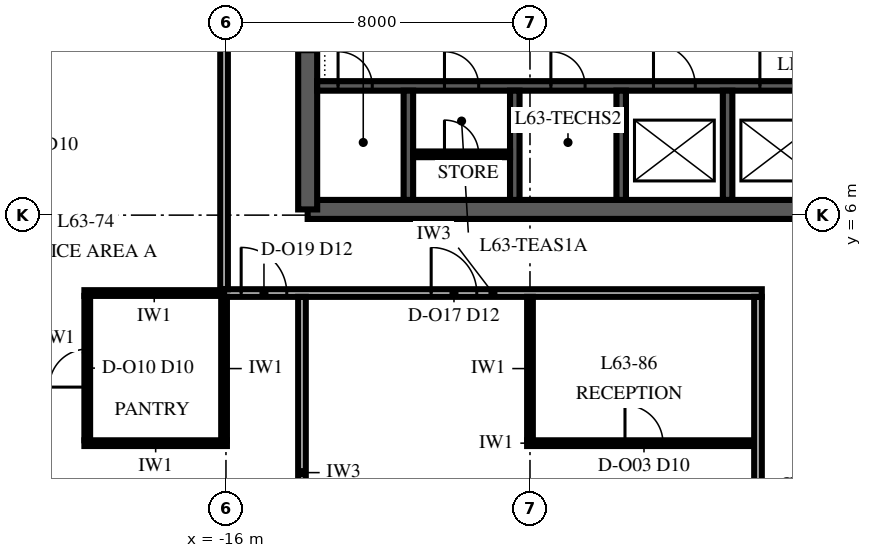
"""IFC4 building model, lengths in metres.
Left out: names, types, materials, properties, quantities, classifications, styles, units other than length and angle.
Written with IfcOpenShell. Run it as: python <this file> out.ifc"""

import sys

from ifc_helpers import new_model, si_unit, direction, frame, frame_2d, origin, place, context, subcontext, project, spatial, polyline, rectangle, outline, extrude, element, fill, save


model = new_model("IFC4")
c1 = context("Model", 3, precision=1e-05, world=origin(), true_north=direction((0.0, 1.0)))
c2 = subcontext(c1, "Body", "Model", "MODEL_VIEW")
j1 = project(units=[si_unit("LENGTHUNIT", "METRE"), si_unit("PLANEANGLEUNIT", "RADIAN")], contexts=[c1])
p1 = place(None, origin())
s1 = spatial("IfcSite", under=j1, at=p1, CompositionType="ELEMENT")
p2 = place(p1, origin())
s2 = spatial("IfcBuilding", under=s1, at=p2, CompositionType="ELEMENT")
p3 = place(p2, frame((0.0, 0.0, 272.0)))
s3 = spatial("IfcBuildingStorey", under=s2, at=p3, CompositionType="ELEMENT", Elevation=272.0)
p4 = place(p3, frame((-13.85, 6.15, 0.0), z_axis=(0.0, 0.0, 1.0), x_axis=(1.0, 0.0, 0.0)))
e1 = element("IfcWall", 1, at=p4, inside=s3, PredefinedType="SHEAR", context=c2, shape_type="SweptSolid", body=[
    extrude(rectangle(XDim=27.7, YDim=0.5, at=frame_2d((13.85, 0.0))), origin(), (0.0, 0.0, 1.0), 4.0),
])
p5 = place(p3, frame((-13.85, 23.85, 0.0), z_axis=(0.0, 0.0, 1.0), x_axis=(0.0, -1.0, 0.0)))
e2 = element("IfcWall", 2, at=p5, inside=s3, PredefinedType="SHEAR", context=c2, shape_type="SweptSolid", body=[
    extrude(outline(polyline([(0.0, -0.25), (17.7, -0.25), (17.7, 0.0), (17.45, 0.0), (17.45, 0.25), (0.25, 0.25), (0.25, 0.0), (0.0, 0.0), (0.0, -0.25)])), origin(), (0.0, 0.0, 1.0), 4.0),
])
p6 = place(p5, frame((11.75, 0.0, 0.0)))
e3 = element("IfcOpeningElement", 3, at=p6, cuts=e2, PredefinedType="OPENING", context=c2, shape_type="SweptSolid", body=[
    extrude(rectangle(XDim=1.8, YDim=2.4, at=frame_2d((0.9, 1.2))), frame((0.0, 0.265, 0.0), z_axis=(0.0, -1.0, 0.0), x_axis=(1.0, 0.0, 0.0)), (0.0, 0.0, 1.0), 0.53),
])
p7 = place(p3, frame((-13.6, 9.4, 0.0), z_axis=(0.0, 0.0, 1.0), x_axis=(1.0, 0.0, 0.0)))
e4 = element("IfcWall", 4, at=p7, inside=s3, PredefinedType="SHEAR", context=c2, shape_type="SweptSolid", body=[
    extrude(rectangle(XDim=27.2, YDim=0.25, at=frame_2d((13.6, 0.0))), origin(), (0.0, 0.0, 1.0), 4.0),
])
p8 = place(p7, frame((8.85, 0.0, 0.0)))
e5 = element("IfcOpeningElement", 5, at=p8, cuts=e4, PredefinedType="OPENING", context=c2, shape_type="SweptSolid", body=[
    extrude(rectangle(XDim=1.1, YDim=2.1, at=frame_2d((0.55, 1.05))), frame((0.0, 0.14, 0.0), z_axis=(0.0, -1.0, 0.0), x_axis=(1.0, 0.0, 0.0)), (0.0, 0.0, 1.0), 0.28),
])
p9 = place(p7, frame((11.65, 0.0, 0.0)))
e6 = element("IfcOpeningElement", 6, at=p9, cuts=e4, PredefinedType="OPENING", context=c2, shape_type="SweptSolid", body=[
    extrude(rectangle(XDim=1.1, YDim=2.1, at=frame_2d((0.55, 1.05))), frame((0.0, 0.14, 0.0), z_axis=(0.0, -1.0, 0.0), x_axis=(1.0, 0.0, 0.0)), (0.0, 0.0, 1.0), 0.28),
])
p10 = place(p7, frame((14.45, 0.0, 0.0)))
e7 = element("IfcOpeningElement", 7, at=p10, cuts=e4, PredefinedType="OPENING", context=c2, shape_type="SweptSolid", body=[
    extrude(rectangle(XDim=1.1, YDim=2.1, at=frame_2d((0.55, 1.05))), frame((0.0, 0.14, 0.0), z_axis=(0.0, -1.0, 0.0), x_axis=(1.0, 0.0, 0.0)), (0.0, 0.0, 1.0), 0.28),
])
p11 = place(p7, frame((0.55, 0.0, 0.0)))
e8 = element("IfcOpeningElement", 8, at=p11, cuts=e4, PredefinedType="OPENING", context=c2, shape_type="SweptSolid", body=[
    extrude(rectangle(XDim=0.9, YDim=2.1, at=frame_2d((0.45, 1.05))), frame((0.0, 0.14, 0.0), z_axis=(0.0, -1.0, 0.0), x_axis=(1.0, 0.0, 0.0)), (0.0, 0.0, 1.0), 0.28),
])
p12 = place(p7, frame((3.35, 0.0, 0.0)))
e9 = element("IfcOpeningElement", 9, at=p12, cuts=e4, PredefinedType="OPENING", context=c2, shape_type="SweptSolid", body=[
    extrude(rectangle(XDim=0.9, YDim=2.1, at=frame_2d((0.45, 1.05))), frame((0.0, 0.14, 0.0), z_axis=(0.0, -1.0, 0.0), x_axis=(1.0, 0.0, 0.0)), (0.0, 0.0, 1.0), 0.28),
])
p13 = place(p7, frame((6.15, 0.0, 0.0)))
e10 = element("IfcOpeningElement", 10, at=p13, cuts=e4, PredefinedType="OPENING", context=c2, shape_type="SweptSolid", body=[
    extrude(rectangle(XDim=0.9, YDim=2.1, at=frame_2d((0.45, 1.05))), frame((0.0, 0.14, 0.0), z_axis=(0.0, -1.0, 0.0), x_axis=(1.0, 0.0, 0.0)), (0.0, 0.0, 1.0), 0.28),
])
p14 = place(p7, frame((17.35, 0.0, 0.0)))
e11 = element("IfcOpeningElement", 11, at=p14, cuts=e4, PredefinedType="OPENING", context=c2, shape_type="SweptSolid", body=[
    extrude(rectangle(XDim=0.9, YDim=2.1, at=frame_2d((0.45, 1.05))), frame((0.0, 0.14, 0.0), z_axis=(0.0, -1.0, 0.0), x_axis=(1.0, 0.0, 0.0)), (0.0, 0.0, 1.0), 0.28),
])
p15 = place(p7, frame((20.15, 0.0, 0.0)))
e12 = element("IfcOpeningElement", 12, at=p15, cuts=e4, PredefinedType="OPENING", context=c2, shape_type="SweptSolid", body=[
    extrude(rectangle(XDim=0.9, YDim=2.1, at=frame_2d((0.45, 1.05))), frame((0.0, 0.14, 0.0), z_axis=(0.0, -1.0, 0.0), x_axis=(1.0, 0.0, 0.0)), (0.0, 0.0, 1.0), 0.28),
])
p16 = place(p7, frame((22.95, 0.0, 0.0)))
e13 = element("IfcOpeningElement", 13, at=p16, cuts=e4, PredefinedType="OPENING", context=c2, shape_type="SweptSolid", body=[
    extrude(rectangle(XDim=0.9, YDim=2.1, at=frame_2d((0.45, 1.05))), frame((0.0, 0.14, 0.0), z_axis=(0.0, -1.0, 0.0), x_axis=(1.0, 0.0, 0.0)), (0.0, 0.0, 1.0), 0.28),
])
for number, where, z_axis, x_axis in (
    (14, (-11.2, 6.4, 0.0), (0.0, 0.0, 1.0), (0.0, 1.0, 0.0)),
    (15, (-8.4, 6.4, 0.0), (0.0, 0.0, 1.0), (0.0, 1.0, 0.0)),
    (16, (-5.6, 6.4, 0.0), (0.0, 0.0, 1.0), (0.0, 1.0, 0.0)),
    (17, (-2.8, 6.4, 0.0), (0.0, 0.0, 1.0), (0.0, 1.0, 0.0)),
):
    element("IfcWall", number, at=place(p3, frame(where, z_axis=z_axis, x_axis=x_axis)), inside=s3, PredefinedType="SHEAR", context=c2, shape_type="SweptSolid", body=[
        extrude(rectangle(XDim=2.875, YDim=0.25, at=frame_2d((1.438, 0.0))), origin(), (0.0, 0.0, 1.0), 4.0),
    ])
p17 = place(p3, frame((-11.075, 7.6, 0.0), z_axis=(0.0, 0.0, 1.0), x_axis=(1.0, 0.0, 0.0)))
e18 = element("IfcWall", 18, at=p17, inside=s3, PredefinedType="PARTITIONING", context=c2, shape_type="SweptSolid", body=[
    extrude(rectangle(XDim=2.55, YDim=0.15, at=frame_2d((1.275, 0.0))), origin(), (0.0, 0.0, 1.0), 3.85),
])
p18 = place(p17, frame((0.825, 0.0, 0.0)))
e19 = element("IfcOpeningElement", 19, at=p18, cuts=e18, PredefinedType="OPENING", context=c2, shape_type="SweptSolid", body=[
    extrude(rectangle(XDim=0.9, YDim=2.1, at=frame_2d((0.45, 1.05))), frame((0.0, 0.09, 0.0), z_axis=(0.0, -1.0, 0.0), x_axis=(1.0, 0.0, 0.0)), (0.0, 0.0, 1.0), 0.18),
])
p19 = place(p3, frame((-19.725, 0.0, 0.0), z_axis=(0.0, 0.0, 1.0), x_axis=(1.0, 0.0, 0.0)))
e20 = element("IfcWall", 20, at=p19, inside=s3, PredefinedType="PARTITIONING", context=c2, shape_type="SweptSolid", body=[
    extrude(rectangle(XDim=3.75, YDim=0.15, at=frame_2d((1.875, 0.0))), origin(), (0.0, 0.0, 1.0), 3.23),
])
p20 = place(p3, frame((-8.075, 0.0, 0.0), z_axis=(0.0, 0.0, 1.0), x_axis=(1.0, 0.0, 0.0)))
e21 = element("IfcWall", 21, at=p20, inside=s3, PredefinedType="PARTITIONING", context=c2, shape_type="SweptSolid", body=[
    extrude(rectangle(XDim=5.975, YDim=0.15, at=frame_2d((2.987, 0.0))), origin(), (0.0, 0.0, 1.0), 3.23),
])
p21 = place(p20, frame((2.575, 0.0, 0.0)))
e22 = element("IfcOpeningElement", 22, at=p21, cuts=e21, PredefinedType="OPENING", context=c2, shape_type="SweptSolid", body=[
    extrude(rectangle(XDim=1.0, YDim=2.3, at=frame_2d((0.5, 1.15))), frame((0.0, 0.09, 0.0), z_axis=(0.0, -1.0, 0.0), x_axis=(1.0, 0.0, 0.0)), (0.0, 0.0, 1.0), 0.18),
])
p22 = place(p3, frame((-19.725, 3.95, 0.0), z_axis=(0.0, 0.0, 1.0), x_axis=(1.0, 0.0, 0.0)))
e23 = element("IfcWall", 23, at=p22, inside=s3, PredefinedType="PARTITIONING", context=c2, shape_type="SweptSolid", body=[
    extrude(rectangle(XDim=3.675, YDim=0.15, at=frame_2d((1.837, 0.0))), origin(), (0.0, 0.0, 1.0), 3.23),
])
p23 = place(p3, frame((-16.05, 3.95, 0.0), z_axis=(0.0, 0.0, 1.0), x_axis=(1.0, 0.0, 0.0)))
e24 = element("IfcWall", 24, at=p23, inside=s3, PredefinedType="PARTITIONING", context=c2, shape_type="SweptSolid", body=[
    extrude(rectangle(XDim=14.15, YDim=0.2, at=frame_2d((7.075, 0.0))), origin(), (0.0, 0.0, 1.0), 3.23),
])
p24 = place(p23, frame((5.45, 0.0, 0.0)))
e25 = element("IfcOpeningElement", 25, at=p24, cuts=e24, PredefinedType="OPENING", context=c2, shape_type="SweptSolid", body=[
    extrude(rectangle(XDim=1.2, YDim=2.4, at=frame_2d((0.6, 1.2))), frame((0.0, 0.115, 0.0), z_axis=(0.0, -1.0, 0.0), x_axis=(1.0, 0.0, 0.0)), (0.0, 0.0, 1.0), 0.23),
])
p25 = place(p23, frame((0.45, 0.0, 0.0)))
e26 = element("IfcOpeningElement", 26, at=p25, cuts=e24, PredefinedType="OPENING", context=c2, shape_type="SweptSolid", body=[
    extrude(rectangle(XDim=1.2, YDim=2.4, at=frame_2d((0.6, 1.2))), frame((0.0, 0.115, 0.0), z_axis=(0.0, -1.0, 0.0), x_axis=(1.0, 0.0, 0.0)), (0.0, 0.0, 1.0), 0.23),
])
p26 = place(p3, frame((-19.65, 0.075, 0.0), z_axis=(0.0, 0.0, 1.0), x_axis=(0.0, 1.0, 0.0)))
e27 = element("IfcWall", 27, at=p26, inside=s3, PredefinedType="PARTITIONING", context=c2, shape_type="SweptSolid", body=[
    extrude(rectangle(XDim=3.8, YDim=0.15, at=frame_2d((1.9, 0.0))), origin(), (0.0, 0.0, 1.0), 3.85),
])
p27 = place(p26, frame((1.4, 0.0, 0.0)))
e28 = element("IfcOpeningElement", 28, at=p27, cuts=e27, PredefinedType="OPENING", context=c2, shape_type="SweptSolid", body=[
    extrude(rectangle(XDim=1.0, YDim=2.3, at=frame_2d((0.5, 1.15))), frame((0.0, 0.09, 0.0), z_axis=(0.0, -1.0, 0.0), x_axis=(1.0, 0.0, 0.0)), (0.0, 0.0, 1.0), 0.18),
])
p28 = place(p3, frame((-16.05, 0.075, 0.0), z_axis=(0.0, 0.0, 1.0), x_axis=(0.0, 1.0, 0.0)))
e29 = element("IfcWall", 29, at=p28, inside=s3, PredefinedType="PARTITIONING", context=c2, shape_type="SweptSolid", body=[
    extrude(rectangle(XDim=3.775, YDim=0.15, at=frame_2d((1.888, 0.0))), origin(), (0.0, 0.0, 1.0), 3.85),
])
p29 = place(p3, frame((-16.05, 4.05, 0.0), z_axis=(0.0, 0.0, 1.0), x_axis=(0.0, 1.0, 0.0)))
e30 = element("IfcWall", 30, at=p29, inside=s3, PredefinedType="PARTITIONING", context=c2, shape_type="SweptSolid", body=[
    extrude(rectangle(XDim=21.9, YDim=0.2, at=frame_2d((10.95, 0.0))), origin(), (0.0, 0.0, 1.0), 2.842),
])
p30 = place(p29, frame((20.35, 0.0, 0.0)))
e31 = element("IfcOpeningElement", 31, at=p30, cuts=e30, PredefinedType="OPENING", context=c2, shape_type="SweptSolid", body=[
    extrude(rectangle(XDim=1.2, YDim=2.4, at=frame_2d((0.6, 1.2))), frame((0.0, 0.115, 0.0), z_axis=(0.0, -1.0, 0.0), x_axis=(1.0, 0.0, 0.0)), (0.0, 0.0, 1.0), 0.23),
])
p31 = place(p3, frame((-14.0, -5.4, 0.0), z_axis=(0.0, 0.0, 1.0), x_axis=(0.0, 1.0, 0.0)))
e32 = element("IfcWall", 32, at=p31, inside=s3, PredefinedType="PARTITIONING", context=c2, shape_type="SweptSolid", body=[
    extrude(rectangle(XDim=9.25, YDim=0.2, at=frame_2d((4.625, 0.0))), origin(), (0.0, 0.0, 1.0), 3.23),
])
p32 = place(p3, frame((-8.0, 0.075, 0.0), z_axis=(0.0, 0.0, 1.0), x_axis=(0.0, 1.0, 0.0)))
e33 = element("IfcWall", 33, at=p32, inside=s3, PredefinedType="PARTITIONING", context=c2, shape_type="SweptSolid", body=[
    extrude(rectangle(XDim=3.775, YDim=0.15, at=frame_2d((1.888, 0.0))), origin(), (0.0, 0.0, 1.0), 3.85),
])
p33 = place(p3, frame((-2.0, -8.325, 0.0), z_axis=(0.0, 0.0, 1.0), x_axis=(0.0, 1.0, 0.0)))
e34 = element("IfcWall", 34, at=p33, inside=s3, PredefinedType="PARTITIONING", context=c2, shape_type="SweptSolid", body=[
    extrude(rectangle(XDim=12.175, YDim=0.2, at=frame_2d((6.087, 0.0))), origin(), (0.0, 0.0, 1.0), 2.842),
])
p34 = place(p8, origin())
e35 = element("IfcDoor", 35, at=p34, inside=s3, OperationType="SLIDING_TO_LEFT", PredefinedType="DOOR", context=c2, shape_type="SweptSolid", body=[
    extrude(rectangle(XDim=1.1, YDim=2.1, at=frame_2d((0.55, 1.05))), frame((0.0, 0.125, 0.0), z_axis=(0.0, -1.0, 0.0), x_axis=(1.0, 0.0, 0.0)), (0.0, 0.0, 1.0), 0.25),
])
fill(e5, e35)
p35 = place(p9, origin())
e36 = element("IfcDoor", 36, at=p35, inside=s3, OperationType="SLIDING_TO_LEFT", PredefinedType="DOOR", context=c2, shape_type="SweptSolid", body=[
    extrude(rectangle(XDim=1.1, YDim=2.1, at=frame_2d((0.55, 1.05))), frame((0.0, 0.125, 0.0), z_axis=(0.0, -1.0, 0.0), x_axis=(1.0, 0.0, 0.0)), (0.0, 0.0, 1.0), 0.25),
])
fill(e6, e36)
p36 = place(p11, origin())
e37 = element("IfcDoor", 37, at=p36, inside=s3, OperationType="SINGLE_SWING_LEFT", PredefinedType="DOOR", context=c2, shape_type="SweptSolid", body=[
    extrude(rectangle(XDim=0.9, YDim=2.1, at=frame_2d((0.45, 1.05))), frame((0.0, 0.125, 0.0), z_axis=(0.0, -1.0, 0.0), x_axis=(1.0, 0.0, 0.0)), (0.0, 0.0, 1.0), 0.25),
])
fill(e8, e37)
p37 = place(p12, origin())
e38 = element("IfcDoor", 38, at=p37, inside=s3, OperationType="SINGLE_SWING_LEFT", PredefinedType="DOOR", context=c2, shape_type="SweptSolid", body=[
    extrude(rectangle(XDim=0.9, YDim=2.1, at=frame_2d((0.45, 1.05))), frame((0.0, 0.125, 0.0), z_axis=(0.0, -1.0, 0.0), x_axis=(1.0, 0.0, 0.0)), (0.0, 0.0, 1.0), 0.25),
])
fill(e9, e38)
p38 = place(p18, origin())
e39 = element("IfcDoor", 39, at=p38, inside=s3, OperationType="SINGLE_SWING_LEFT", PredefinedType="DOOR", context=c2, shape_type="SweptSolid", body=[
    extrude(rectangle(XDim=0.9, YDim=2.1, at=frame_2d((0.45, 1.05))), frame((0.0, 0.075, 0.0), z_axis=(0.0, -1.0, 0.0), x_axis=(1.0, 0.0, 0.0)), (0.0, 0.0, 1.0), 0.149),
])
fill(e19, e39)
p39 = place(p13, origin())
e40 = element("IfcDoor", 40, at=p39, inside=s3, OperationType="SINGLE_SWING_LEFT", PredefinedType="DOOR", context=c2, shape_type="SweptSolid", body=[
    extrude(rectangle(XDim=0.9, YDim=2.1, at=frame_2d((0.45, 1.05))), frame((0.0, 0.125, 0.0), z_axis=(0.0, -1.0, 0.0), x_axis=(1.0, 0.0, 0.0)), (0.0, 0.0, 1.0), 0.25),
])
fill(e10, e40)
p40 = place(p21, origin())
e41 = element("IfcDoor", 41, at=p40, inside=s3, OperationType="SINGLE_SWING_LEFT", PredefinedType="DOOR", context=c2, shape_type="SweptSolid", body=[
    extrude(rectangle(XDim=1.0, YDim=2.3, at=frame_2d((0.5, 1.15))), frame((0.0, 0.075, 0.0), z_axis=(0.0, -1.0, 0.0), x_axis=(1.0, 0.0, 0.0)), (0.0, 0.0, 1.0), 0.149),
])
fill(e22, e41)
p41 = place(p27, origin())
e42 = element("IfcDoor", 42, at=p41, inside=s3, OperationType="SINGLE_SWING_LEFT", PredefinedType="DOOR", context=c2, shape_type="SweptSolid", body=[
    extrude(rectangle(XDim=1.0, YDim=2.3, at=frame_2d((0.5, 1.15))), frame((0.0, 0.075, 0.0), z_axis=(0.0, -1.0, 0.0), x_axis=(1.0, 0.0, 0.0)), (0.0, 0.0, 1.0), 0.149),
])
fill(e28, e42)
p42 = place(p24, origin())
e43 = element("IfcDoor", 43, at=p42, inside=s3, OperationType="SINGLE_SWING_LEFT", PredefinedType="DOOR", context=c2, shape_type="SweptSolid", body=[
    extrude(rectangle(XDim=1.2, YDim=2.4, at=frame_2d((0.6, 1.2))), frame((0.0, 0.1, 0.0), z_axis=(0.0, -1.0, 0.0), x_axis=(1.0, 0.0, 0.0)), (0.0, 0.0, 1.0), 0.199),
])
fill(e25, e43)
p43 = place(p25, origin())
e44 = element("IfcDoor", 44, at=p43, inside=s3, OperationType="SINGLE_SWING_LEFT", PredefinedType="DOOR", context=c2, shape_type="SweptSolid", body=[
    extrude(rectangle(XDim=1.2, YDim=2.4, at=frame_2d((0.6, 1.2))), frame((0.0, 0.1, 0.0), z_axis=(0.0, -1.0, 0.0), x_axis=(1.0, 0.0, 0.0)), (0.0, 0.0, 1.0), 0.199),
])
fill(e26, e44)
save(model, sys.argv[1])
